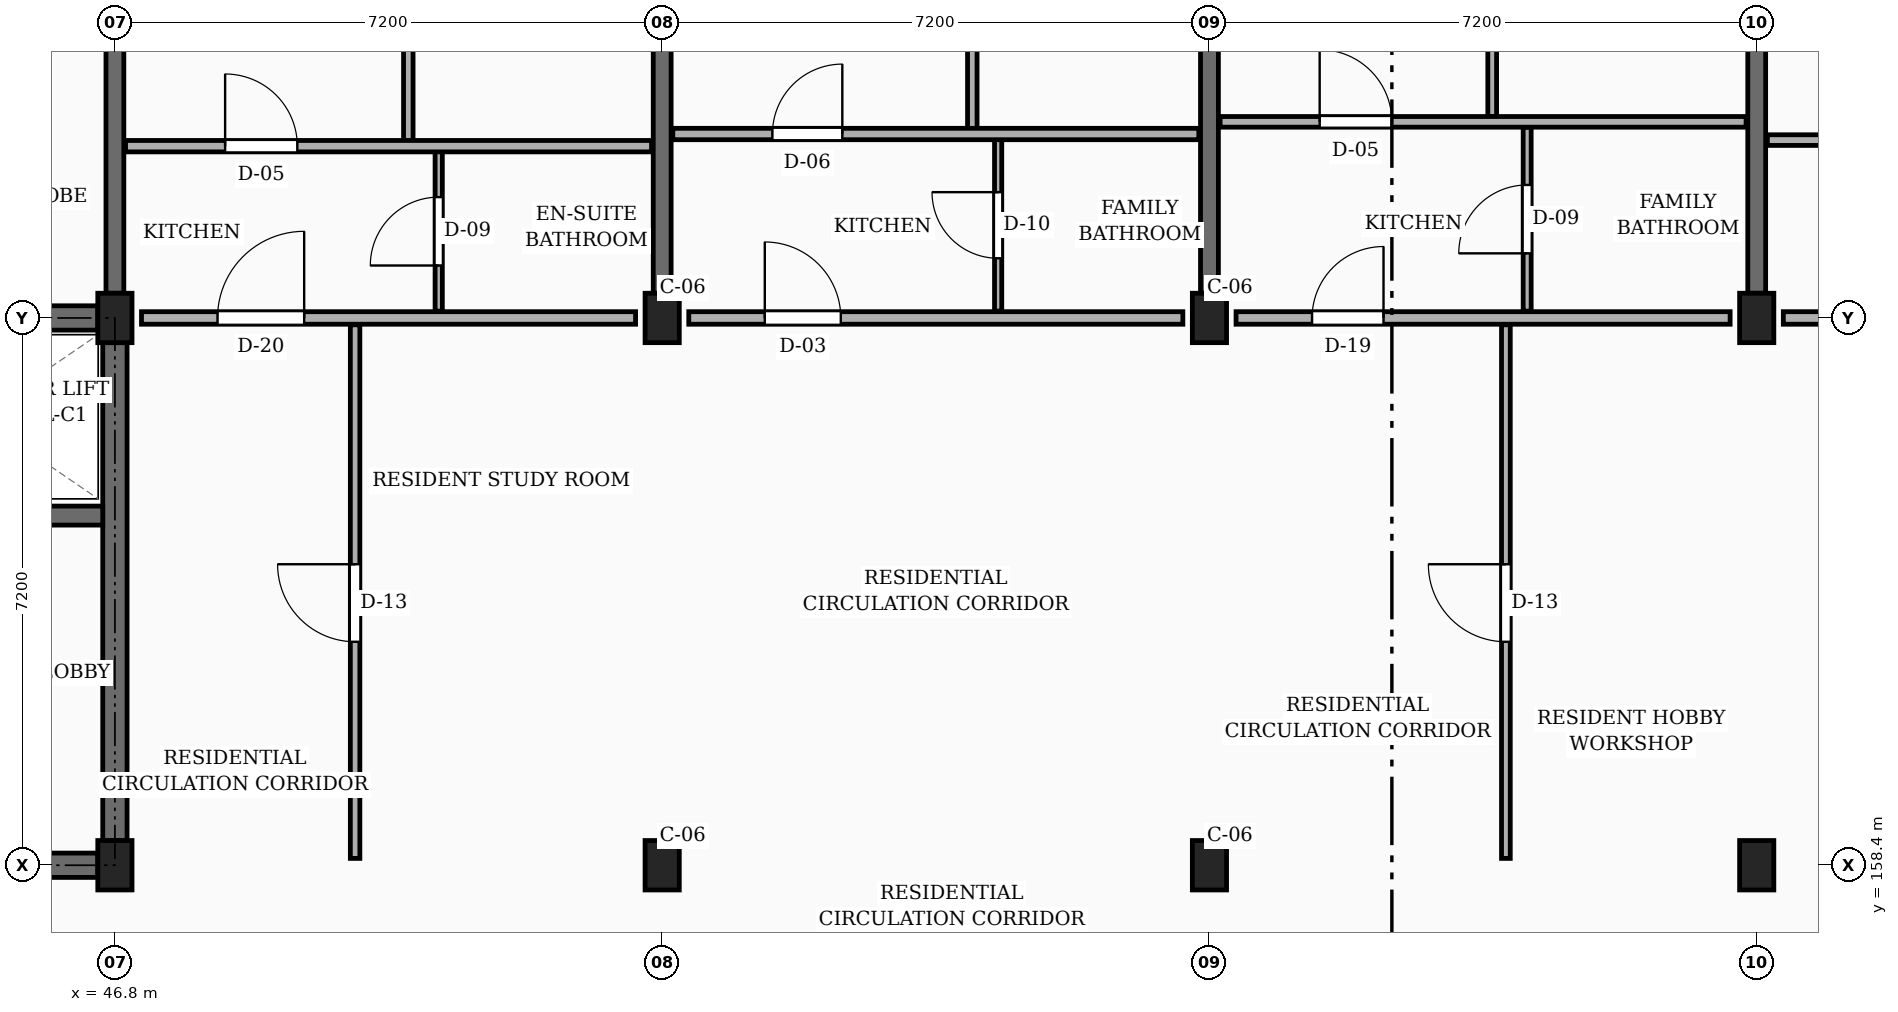
"""IFC4 building model, lengths in metres.
Left out: names, types, materials, properties, quantities, classifications, styles, units other than length and angle.
Written with IfcOpenShell. Run it as: python <this file> out.ifc"""

import sys

from ifc_helpers import new_model, si_unit, direction, frame, frame_2d, origin, origin_2d, place, context, subcontext, project, spatial, rectangle, extrude, element, fill, save


model = new_model("IFC4")
c1 = context("Model", 3, precision=1e-05, world=origin(), true_north=direction((0.0, 1.0)))
c2 = subcontext(c1, "Body", "Model", "MODEL_VIEW")
j1 = project(units=[si_unit("LENGTHUNIT", "METRE"), si_unit("PLANEANGLEUNIT", "RADIAN")], contexts=[c1])
p1 = place(None, origin())
s1 = spatial("IfcSite", under=j1, at=p1, CompositionType="ELEMENT")
p2 = place(p1, origin())
s2 = spatial("IfcBuilding", under=s1, at=p2, CompositionType="ELEMENT")
p3 = place(p2, frame((0.0, 0.0, 13.95)))
s3 = spatial("IfcBuildingStorey", under=s2, at=p3, CompositionType="ELEMENT", Elevation=13.95)
for number, where, z_axis, x_axis in (
    (1, (46.8, 158.4, 0.0), (0.0, 0.0, 1.0), (1.0, 0.0, 0.0)),
    (2, (46.8, 165.6, 0.0), (0.0, 0.0, 1.0), (1.0, 0.0, 0.0)),
    (3, (54.0, 158.4, 0.0), (0.0, 0.0, 1.0), (1.0, 0.0, 0.0)),
    (4, (54.0, 165.6, 0.0), (0.0, 0.0, 1.0), (1.0, 0.0, 0.0)),
    (5, (61.2, 158.4, 0.0), (0.0, 0.0, 1.0), (1.0, 0.0, 0.0)),
    (6, (61.2, 165.6, 0.0), (0.0, 0.0, 1.0), (1.0, 0.0, 0.0)),
    (7, (68.4, 158.4, 0.0), (0.0, 0.0, 1.0), (1.0, 0.0, 0.0)),
    (8, (68.4, 165.6, 0.0), (0.0, 0.0, 1.0), (1.0, 0.0, 0.0)),
):
    element("IfcColumn", number, at=place(p3, frame(where, z_axis=z_axis, x_axis=x_axis)), inside=s3, PredefinedType="COLUMN", context=c2, shape_type="SweptSolid", body=[
        extrude(rectangle(XDim=0.45, YDim=0.65, at=origin_2d()), origin(), (0.0, 0.0, 1.0), 3.15),
    ])
for number, where, z_axis, x_axis in (
    (9, (46.8, 165.925, 0.0), (0.0, 0.0, 1.0), (0.0, 1.0, 0.0)),
    (10, (54.0, 165.925, 0.0), (0.0, 0.0, 1.0), (0.0, 1.0, 0.0)),
    (11, (61.2, 165.925, 0.0), (0.0, 0.0, 1.0), (0.0, 1.0, 0.0)),
    (12, (68.4, 165.925, 0.0), (0.0, 0.0, 1.0), (0.0, 1.0, 0.0)),
):
    element("IfcWall", number, at=place(p3, frame(where, z_axis=z_axis, x_axis=x_axis)), inside=s3, PredefinedType="SOLIDWALL", context=c2, shape_type="SweptSolid", body=[
        extrude(rectangle(XDim=6.6, YDim=0.235, at=frame_2d((3.3, 0.0))), origin(), (0.0, 0.0, 1.0), 2.185),
    ])
p4 = place(p3, frame((39.825, 165.6, 0.0), z_axis=(0.0, 0.0, 1.0), x_axis=(1.0, 0.0, 0.0)))
e13 = element("IfcWall", 13, at=p4, inside=s3, PredefinedType="SHEAR", context=c2, shape_type="SweptSolid", body=[
    extrude(rectangle(XDim=6.75, YDim=0.32, at=frame_2d((3.375, 0.0))), origin(), (0.0, 0.0, 1.0), 2.885),
])
p5 = place(p3, frame((46.8, 158.725, 0.0), z_axis=(0.0, 0.0, 1.0), x_axis=(0.0, 1.0, 0.0)))
e14 = element("IfcWall", 14, at=p5, inside=s3, PredefinedType="SHEAR", context=c2, shape_type="SweptSolid", body=[
    extrude(rectangle(XDim=6.55, YDim=0.32, at=frame_2d((3.275, 0.0))), origin(), (0.0, 0.0, 1.0), 2.885),
])
p6 = place(p3, frame((39.825, 158.4, 0.0), z_axis=(0.0, 0.0, 1.0), x_axis=(1.0, 0.0, 0.0)))
e15 = element("IfcWall", 15, at=p6, inside=s3, PredefinedType="SHEAR", context=c2, shape_type="SweptSolid", body=[
    extrude(rectangle(XDim=6.75, YDim=0.32, at=frame_2d((3.375, 0.0))), origin(), (0.0, 0.0, 1.0), 2.885),
])
p7 = place(p6, frame((4.525, 0.0, 0.0)))
e16 = element("IfcOpeningElement", 16, at=p7, cuts=e15, PredefinedType="OPENING", context=c2, shape_type="SweptSolid", body=[
    extrude(rectangle(XDim=1.1, YDim=2.15, at=frame_2d((0.55, 1.075))), frame((0.0, 0.17, 0.0), z_axis=(0.0, -1.0, 0.0), x_axis=(1.0, 0.0, 0.0)), (0.0, 0.0, 1.0), 0.34),
])
p8 = place(p3, frame((43.325, 163.0, 0.0), z_axis=(0.0, 0.0, 1.0), x_axis=(1.0, 0.0, 0.0)))
e17 = element("IfcWall", 17, at=p8, inside=s3, PredefinedType="SHEAR", context=c2, shape_type="SweptSolid", body=[
    extrude(rectangle(XDim=3.315, YDim=0.25, at=frame_2d((1.657, 0.0))), origin(), (0.0, 0.0, 1.0), 2.885),
])
p9 = place(p8, frame((1.1, 0.0, 0.0)))
e18 = element("IfcOpeningElement", 18, at=p9, cuts=e17, PredefinedType="OPENING", context=c2, shape_type="SweptSolid", body=[
    extrude(rectangle(XDim=1.0, YDim=2.2, at=frame_2d((0.5, 1.1))), frame((0.0, 0.135, 0.0), z_axis=(0.0, -1.0, 0.0), x_axis=(1.0, 0.0, 0.0)), (0.0, 0.0, 1.0), 0.27),
])
p10 = place(p3, frame((47.15, 165.6, 0.0), z_axis=(0.0, 0.0, 1.0), x_axis=(1.0, 0.0, 0.0)))
e19 = element("IfcWall", 19, at=p10, inside=s3, PredefinedType="PARTITIONING", context=c2, shape_type="SweptSolid", body=[
    extrude(rectangle(XDim=6.5, YDim=0.165, at=frame_2d((3.25, 0.0))), origin(), (0.0, 0.0, 1.0), 2.235),
])
p11 = place(p10, frame((1.0, 0.0, 0.0)))
e20 = element("IfcOpeningElement", 20, at=p11, cuts=e19, PredefinedType="OPENING", context=c2, shape_type="SweptSolid", body=[
    extrude(rectangle(XDim=1.14, YDim=2.18, at=frame_2d((0.57, 1.09))), frame((0.0, 0.093, 0.0), z_axis=(0.0, -1.0, 0.0), x_axis=(1.0, 0.0, 0.0)), (0.0, 0.0, 1.0), 0.185),
])
p12 = place(p3, frame((54.35, 165.6, 0.0), z_axis=(0.0, 0.0, 1.0), x_axis=(1.0, 0.0, 0.0)))
e21 = element("IfcWall", 21, at=p12, inside=s3, PredefinedType="PARTITIONING", context=c2, shape_type="SweptSolid", body=[
    extrude(rectangle(XDim=6.5, YDim=0.165, at=frame_2d((3.25, 0.0))), origin(), (0.0, 0.0, 1.0), 2.235),
])
p13 = place(p12, frame((1.0, 0.0, 0.0)))
e22 = element("IfcOpeningElement", 22, at=p13, cuts=e21, PredefinedType="OPENING", context=c2, shape_type="SweptSolid", body=[
    extrude(rectangle(XDim=1.0, YDim=2.15, at=frame_2d((0.5, 1.075))), frame((0.0, 0.093, 0.0), z_axis=(0.0, -1.0, 0.0), x_axis=(1.0, 0.0, 0.0)), (0.0, 0.0, 1.0), 0.185),
])
p14 = place(p3, frame((61.55, 165.6, 0.0), z_axis=(0.0, 0.0, 1.0), x_axis=(1.0, 0.0, 0.0)))
e23 = element("IfcWall", 23, at=p14, inside=s3, PredefinedType="PARTITIONING", context=c2, shape_type="SweptSolid", body=[
    extrude(rectangle(XDim=6.5, YDim=0.165, at=frame_2d((3.25, 0.0))), origin(), (0.0, 0.0, 1.0), 2.235),
])
p15 = place(p14, frame((1.0, 0.0, 0.0)))
e24 = element("IfcOpeningElement", 24, at=p15, cuts=e23, PredefinedType="OPENING", context=c2, shape_type="SweptSolid", body=[
    extrude(rectangle(XDim=0.94, YDim=2.12, at=frame_2d((0.47, 1.06))), frame((0.0, 0.093, 0.0), z_axis=(0.0, -1.0, 0.0), x_axis=(1.0, 0.0, 0.0)), (0.0, 0.0, 1.0), 0.185),
])
p16 = place(p3, frame((68.75, 165.6, 0.0), z_axis=(0.0, 0.0, 1.0), x_axis=(1.0, 0.0, 0.0)))
e25 = element("IfcWall", 25, at=p16, inside=s3, PredefinedType="PARTITIONING", context=c2, shape_type="SweptSolid", body=[
    extrude(rectangle(XDim=6.5, YDim=0.165, at=frame_2d((3.25, 0.0))), origin(), (0.0, 0.0, 1.0), 2.235),
])
p17 = place(p16, frame((1.0, 0.0, 0.0)))
e26 = element("IfcOpeningElement", 26, at=p17, cuts=e25, PredefinedType="OPENING", context=c2, shape_type="SweptSolid", body=[
    extrude(rectangle(XDim=1.14, YDim=2.18, at=frame_2d((0.57, 1.09))), frame((0.0, 0.093, 0.0), z_axis=(0.0, -1.0, 0.0), x_axis=(1.0, 0.0, 0.0)), (0.0, 0.0, 1.0), 0.185),
])
p18 = place(p3, frame((49.96, 158.49, 0.0), z_axis=(0.0, 0.0, 1.0), x_axis=(0.0, 1.0, 0.0)))
e27 = element("IfcWall", 27, at=p18, inside=s3, PredefinedType="PARTITIONING", context=c2, shape_type="SweptSolid", body=[
    extrude(rectangle(XDim=7.02, YDim=0.125, at=frame_2d((3.51, 0.0))), origin(), (0.0, 0.0, 1.0), 2.32),
])
p19 = place(p18, frame((2.85, 0.0, 0.0)))
e28 = element("IfcOpeningElement", 28, at=p19, cuts=e27, PredefinedType="OPENING", context=c2, shape_type="SweptSolid", body=[
    extrude(rectangle(XDim=1.02, YDim=2.15, at=frame_2d((0.51, 1.075))), frame((0.0, 0.073, 0.0), z_axis=(0.0, -1.0, 0.0), x_axis=(1.0, 0.0, 0.0)), (0.0, 0.0, 1.0), 0.145),
])
p20 = place(p3, frame((50.66, 167.93, 0.0), z_axis=(0.0, 0.0, 1.0), x_axis=(0.0, 1.0, 0.0)))
e29 = element("IfcWall", 29, at=p20, inside=s3, PredefinedType="PARTITIONING", context=c2, shape_type="SweptSolid", body=[
    extrude(rectangle(XDim=4.695, YDim=0.125, at=frame_2d((2.348, 0.0))), origin(), (0.0, 0.0, 1.0), 2.32),
])
p21 = place(p20, frame((1.897, 0.0, 0.0)))
e30 = element("IfcOpeningElement", 30, at=p21, cuts=e29, PredefinedType="OPENING", context=c2, shape_type="SweptSolid", body=[
    extrude(rectangle(XDim=0.9, YDim=2.1, at=frame_2d((0.45, 1.05))), frame((0.0, 0.073, 0.0), z_axis=(0.0, -1.0, 0.0), x_axis=(1.0, 0.0, 0.0)), (0.0, 0.0, 1.0), 0.145),
])
p22 = place(p3, frame((51.06, 165.69, 0.0), z_axis=(0.0, 0.0, 1.0), x_axis=(0.0, 1.0, 0.0)))
e31 = element("IfcWall", 31, at=p22, inside=s3, PredefinedType="PARTITIONING", context=c2, shape_type="SweptSolid", body=[
    extrude(rectangle(XDim=2.1, YDim=0.095, at=frame_2d((1.05, 0.0))), origin(), (0.0, 0.0, 1.0), 2.32),
])
p23 = place(p22, frame((0.6, 0.0, 0.0)))
e32 = element("IfcOpeningElement", 32, at=p23, cuts=e31, PredefinedType="OPENING", context=c2, shape_type="SweptSolid", body=[
    extrude(rectangle(XDim=0.9, YDim=2.05, at=frame_2d((0.45, 1.025))), frame((0.0, 0.058, 0.0), z_axis=(0.0, -1.0, 0.0), x_axis=(1.0, 0.0, 0.0)), (0.0, 0.0, 1.0), 0.115),
])
p24 = place(p3, frame((46.94, 167.86, 0.0), z_axis=(0.0, 0.0, 1.0), x_axis=(1.0, 0.0, 0.0)))
e33 = element("IfcWall", 33, at=p24, inside=s3, PredefinedType="PARTITIONING", context=c2, shape_type="SweptSolid", body=[
    extrude(rectangle(XDim=6.92, YDim=0.15, at=frame_2d((3.46, 0.0))), origin(), (0.0, 0.0, 1.0), 2.32),
])
p25 = place(p24, frame((1.31, 0.0, 0.0)))
e34 = element("IfcOpeningElement", 34, at=p25, cuts=e33, PredefinedType="OPENING", context=c2, shape_type="SweptSolid", body=[
    extrude(rectangle(XDim=0.95, YDim=2.1, at=frame_2d((0.475, 1.05))), frame((0.0, 0.085, 0.0), z_axis=(0.0, -1.0, 0.0), x_axis=(1.0, 0.0, 0.0)), (0.0, 0.0, 1.0), 0.17),
])
p26 = place(p3, frame((58.08, 168.09, 0.0), z_axis=(0.0, 0.0, 1.0), x_axis=(0.0, 1.0, 0.0)))
e35 = element("IfcWall", 35, at=p26, inside=s3, PredefinedType="PARTITIONING", context=c2, shape_type="SweptSolid", body=[
    extrude(rectangle(XDim=4.535, YDim=0.125, at=frame_2d((2.268, 0.0))), origin(), (0.0, 0.0, 1.0), 2.32),
])
p27 = place(p26, frame((1.827, 0.0, 0.0)))
e36 = element("IfcOpeningElement", 36, at=p27, cuts=e35, PredefinedType="OPENING", context=c2, shape_type="SweptSolid", body=[
    extrude(rectangle(XDim=0.88, YDim=2.08, at=frame_2d((0.44, 1.04))), frame((0.0, 0.073, 0.0), z_axis=(0.0, -1.0, 0.0), x_axis=(1.0, 0.0, 0.0)), (0.0, 0.0, 1.0), 0.145),
])
p28 = place(p3, frame((58.42, 165.69, 0.0), z_axis=(0.0, 0.0, 1.0), x_axis=(0.0, 1.0, 0.0)))
e37 = element("IfcWall", 37, at=p28, inside=s3, PredefinedType="PARTITIONING", context=c2, shape_type="SweptSolid", body=[
    extrude(rectangle(XDim=2.26, YDim=0.095, at=frame_2d((1.13, 0.0))), origin(), (0.0, 0.0, 1.0), 2.32),
])
p29 = place(p28, frame((0.695, 0.0, 0.0)))
e38 = element("IfcOpeningElement", 38, at=p29, cuts=e37, PredefinedType="OPENING", context=c2, shape_type="SweptSolid", body=[
    extrude(rectangle(XDim=0.87, YDim=2.05, at=frame_2d((0.435, 1.025))), frame((0.0, 0.058, 0.0), z_axis=(0.0, -1.0, 0.0), x_axis=(1.0, 0.0, 0.0)), (0.0, 0.0, 1.0), 0.115),
])
p30 = place(p3, frame((54.14, 168.02, 0.0), z_axis=(0.0, 0.0, 1.0), x_axis=(1.0, 0.0, 0.0)))
e39 = element("IfcWall", 39, at=p30, inside=s3, PredefinedType="PARTITIONING", context=c2, shape_type="SweptSolid", body=[
    extrude(rectangle(XDim=6.92, YDim=0.15, at=frame_2d((3.46, 0.0))), origin(), (0.0, 0.0, 1.0), 2.32),
])
p31 = place(p30, frame((1.31, 0.0, 0.0)))
e40 = element("IfcOpeningElement", 40, at=p31, cuts=e39, PredefinedType="OPENING", context=c2, shape_type="SweptSolid", body=[
    extrude(rectangle(XDim=0.92, YDim=2.1, at=frame_2d((0.46, 1.05))), frame((0.0, 0.085, 0.0), z_axis=(0.0, -1.0, 0.0), x_axis=(1.0, 0.0, 0.0)), (0.0, 0.0, 1.0), 0.17),
])
p32 = place(p3, frame((65.1, 158.49, 0.0), z_axis=(0.0, 0.0, 1.0), x_axis=(0.0, 1.0, 0.0)))
e41 = element("IfcWall", 41, at=p32, inside=s3, PredefinedType="PARTITIONING", context=c2, shape_type="SweptSolid", body=[
    extrude(rectangle(XDim=7.02, YDim=0.115, at=frame_2d((3.51, 0.0))), origin(), (0.0, 0.0, 1.0), 2.32),
])
p33 = place(p32, frame((2.85, 0.0, 0.0)))
e42 = element("IfcOpeningElement", 42, at=p33, cuts=e41, PredefinedType="OPENING", context=c2, shape_type="SweptSolid", body=[
    extrude(rectangle(XDim=1.02, YDim=2.15, at=frame_2d((0.51, 1.075))), frame((0.0, 0.067, 0.0), z_axis=(0.0, -1.0, 0.0), x_axis=(1.0, 0.0, 0.0)), (0.0, 0.0, 1.0), 0.135),
])
p34 = place(p3, frame((64.92, 168.25, 0.0), z_axis=(0.0, 0.0, 1.0), x_axis=(0.0, 1.0, 0.0)))
e43 = element("IfcWall", 43, at=p34, inside=s3, PredefinedType="PARTITIONING", context=c2, shape_type="SweptSolid", body=[
    extrude(rectangle(XDim=4.375, YDim=0.115, at=frame_2d((2.188, 0.0))), origin(), (0.0, 0.0, 1.0), 2.32),
])
p35 = place(p34, frame((1.738, 0.0, 0.0)))
e44 = element("IfcOpeningElement", 44, at=p35, cuts=e43, PredefinedType="OPENING", context=c2, shape_type="SweptSolid", body=[
    extrude(rectangle(XDim=0.9, YDim=2.1, at=frame_2d((0.45, 1.05))), frame((0.0, 0.067, 0.0), z_axis=(0.0, -1.0, 0.0), x_axis=(1.0, 0.0, 0.0)), (0.0, 0.0, 1.0), 0.135),
])
p36 = place(p3, frame((65.38, 165.69, 0.0), z_axis=(0.0, 0.0, 1.0), x_axis=(0.0, 1.0, 0.0)))
e45 = element("IfcWall", 45, at=p36, inside=s3, PredefinedType="PARTITIONING", context=c2, shape_type="SweptSolid", body=[
    extrude(rectangle(XDim=2.42, YDim=0.105, at=frame_2d((1.21, 0.0))), origin(), (0.0, 0.0, 1.0), 2.32),
])
p37 = place(p36, frame((0.76, 0.0, 0.0)))
e46 = element("IfcOpeningElement", 46, at=p37, cuts=e45, PredefinedType="OPENING", context=c2, shape_type="SweptSolid", body=[
    extrude(rectangle(XDim=0.9, YDim=2.05, at=frame_2d((0.45, 1.025))), frame((0.0, 0.062, 0.0), z_axis=(0.0, -1.0, 0.0), x_axis=(1.0, 0.0, 0.0)), (0.0, 0.0, 1.0), 0.125),
])
p38 = place(p3, frame((61.34, 168.18, 0.0), z_axis=(0.0, 0.0, 1.0), x_axis=(1.0, 0.0, 0.0)))
e47 = element("IfcWall", 47, at=p38, inside=s3, PredefinedType="PARTITIONING", context=c2, shape_type="SweptSolid", body=[
    extrude(rectangle(XDim=6.92, YDim=0.14, at=frame_2d((3.46, 0.0))), origin(), (0.0, 0.0, 1.0), 2.32),
])
p39 = place(p38, frame((1.31, 0.0, 0.0)))
e48 = element("IfcOpeningElement", 48, at=p39, cuts=e47, PredefinedType="OPENING", context=c2, shape_type="SweptSolid", body=[
    extrude(rectangle(XDim=0.95, YDim=2.1, at=frame_2d((0.475, 1.05))), frame((0.0, 0.08, 0.0), z_axis=(0.0, -1.0, 0.0), x_axis=(1.0, 0.0, 0.0)), (0.0, 0.0, 1.0), 0.16),
])
p40 = place(p3, frame((68.54, 167.94, 0.0), z_axis=(0.0, 0.0, 1.0), x_axis=(1.0, 0.0, 0.0)))
e49 = element("IfcWall", 49, at=p40, inside=s3, PredefinedType="PARTITIONING", context=c2, shape_type="SweptSolid", body=[
    extrude(rectangle(XDim=6.885, YDim=0.14, at=frame_2d((3.442, 0.0))), origin(), (0.0, 0.0, 1.0), 2.32),
])
p41 = place(p40, frame((1.31, 0.0, 0.0)))
e50 = element("IfcOpeningElement", 50, at=p41, cuts=e49, PredefinedType="OPENING", context=c2, shape_type="SweptSolid", body=[
    extrude(rectangle(XDim=0.92, YDim=2.1, at=frame_2d((0.46, 1.05))), frame((0.0, 0.08, 0.0), z_axis=(0.0, -1.0, 0.0), x_axis=(1.0, 0.0, 0.0)), (0.0, 0.0, 1.0), 0.16),
])
p42 = place(p11, origin())
e51 = element("IfcDoor", 51, at=p42, inside=s3, OperationType="SINGLE_SWING_RIGHT", PredefinedType="DOOR", context=c2, shape_type="SweptSolid", body=[
    extrude(rectangle(XDim=1.14, YDim=2.18, at=frame_2d((0.57, 1.09))), frame((0.0, 0.025, 0.0), z_axis=(0.0, -1.0, 0.0), x_axis=(1.0, 0.0, 0.0)), (0.0, 0.0, 1.0), 0.05),
])
fill(e20, e51)
p43 = place(p13, origin())
e52 = element("IfcDoor", 52, at=p43, inside=s3, OperationType="SINGLE_SWING_LEFT", PredefinedType="DOOR", context=c2, shape_type="SweptSolid", body=[
    extrude(rectangle(XDim=1.0, YDim=2.15, at=frame_2d((0.5, 1.075))), frame((0.0, 0.025, 0.0), z_axis=(0.0, -1.0, 0.0), x_axis=(1.0, 0.0, 0.0)), (0.0, 0.0, 1.0), 0.05),
])
fill(e22, e52)
p44 = place(p15, origin())
e53 = element("IfcDoor", 53, at=p44, inside=s3, OperationType="SINGLE_SWING_RIGHT", PredefinedType="DOOR", context=c2, shape_type="SweptSolid", body=[
    extrude(rectangle(XDim=0.94, YDim=2.12, at=frame_2d((0.47, 1.06))), frame((0.0, 0.025, 0.0), z_axis=(0.0, -1.0, 0.0), x_axis=(1.0, 0.0, 0.0)), (0.0, 0.0, 1.0), 0.05),
])
fill(e24, e53)
p45 = place(p19, origin())
e54 = element("IfcDoor", 54, at=p45, inside=s3, OperationType="SINGLE_SWING_RIGHT", PredefinedType="DOOR", context=c2, shape_type="SweptSolid", body=[
    extrude(rectangle(XDim=1.02, YDim=2.15, at=frame_2d((0.51, 1.075))), frame((0.0, 0.025, 0.0), z_axis=(0.0, -1.0, 0.0), x_axis=(1.0, 0.0, 0.0)), (0.0, 0.0, 1.0), 0.05),
])
fill(e28, e54)
p46 = place(p23, origin())
e55 = element("IfcDoor", 55, at=p46, inside=s3, OperationType="SINGLE_SWING_LEFT", PredefinedType="DOOR", context=c2, shape_type="SweptSolid", body=[
    extrude(rectangle(XDim=0.9, YDim=2.05, at=frame_2d((0.45, 1.025))), frame((0.0, 0.025, 0.0), z_axis=(0.0, -1.0, 0.0), x_axis=(1.0, 0.0, 0.0)), (0.0, 0.0, 1.0), 0.05),
])
fill(e32, e55)
p47 = place(p25, origin())
e56 = element("IfcDoor", 56, at=p47, inside=s3, OperationType="SINGLE_SWING_LEFT", PredefinedType="DOOR", context=c2, shape_type="SweptSolid", body=[
    extrude(rectangle(XDim=0.95, YDim=2.1, at=frame_2d((0.475, 1.05))), frame((0.0, 0.025, 0.0), z_axis=(0.0, -1.0, 0.0), x_axis=(1.0, 0.0, 0.0)), (0.0, 0.0, 1.0), 0.05),
])
fill(e34, e56)
p48 = place(p29, origin())
e57 = element("IfcDoor", 57, at=p48, inside=s3, OperationType="SINGLE_SWING_RIGHT", PredefinedType="DOOR", context=c2, shape_type="SweptSolid", body=[
    extrude(rectangle(XDim=0.87, YDim=2.05, at=frame_2d((0.435, 1.025))), frame((0.0, 0.025, 0.0), z_axis=(0.0, -1.0, 0.0), x_axis=(1.0, 0.0, 0.0)), (0.0, 0.0, 1.0), 0.05),
])
fill(e38, e57)
p49 = place(p31, origin())
e58 = element("IfcDoor", 58, at=p49, inside=s3, OperationType="SINGLE_SWING_RIGHT", PredefinedType="DOOR", context=c2, shape_type="SweptSolid", body=[
    extrude(rectangle(XDim=0.92, YDim=2.1, at=frame_2d((0.46, 1.05))), frame((0.0, 0.025, 0.0), z_axis=(0.0, -1.0, 0.0), x_axis=(1.0, 0.0, 0.0)), (0.0, 0.0, 1.0), 0.05),
])
fill(e40, e58)
p50 = place(p33, origin())
e59 = element("IfcDoor", 59, at=p50, inside=s3, OperationType="SINGLE_SWING_RIGHT", PredefinedType="DOOR", context=c2, shape_type="SweptSolid", body=[
    extrude(rectangle(XDim=1.02, YDim=2.15, at=frame_2d((0.51, 1.075))), frame((0.0, 0.025, 0.0), z_axis=(0.0, -1.0, 0.0), x_axis=(1.0, 0.0, 0.0)), (0.0, 0.0, 1.0), 0.05),
])
fill(e42, e59)
p51 = place(p37, origin())
e60 = element("IfcDoor", 60, at=p51, inside=s3, OperationType="SINGLE_SWING_LEFT", PredefinedType="DOOR", context=c2, shape_type="SweptSolid", body=[
    extrude(rectangle(XDim=0.9, YDim=2.05, at=frame_2d((0.45, 1.025))), frame((0.0, 0.025, 0.0), z_axis=(0.0, -1.0, 0.0), x_axis=(1.0, 0.0, 0.0)), (0.0, 0.0, 1.0), 0.05),
])
fill(e46, e60)
p52 = place(p39, origin())
e61 = element("IfcDoor", 61, at=p52, inside=s3, OperationType="SINGLE_SWING_LEFT", PredefinedType="DOOR", context=c2, shape_type="SweptSolid", body=[
    extrude(rectangle(XDim=0.95, YDim=2.1, at=frame_2d((0.475, 1.05))), frame((0.0, 0.025, 0.0), z_axis=(0.0, -1.0, 0.0), x_axis=(1.0, 0.0, 0.0)), (0.0, 0.0, 1.0), 0.05),
])
fill(e48, e61)
save(model, sys.argv[1])
